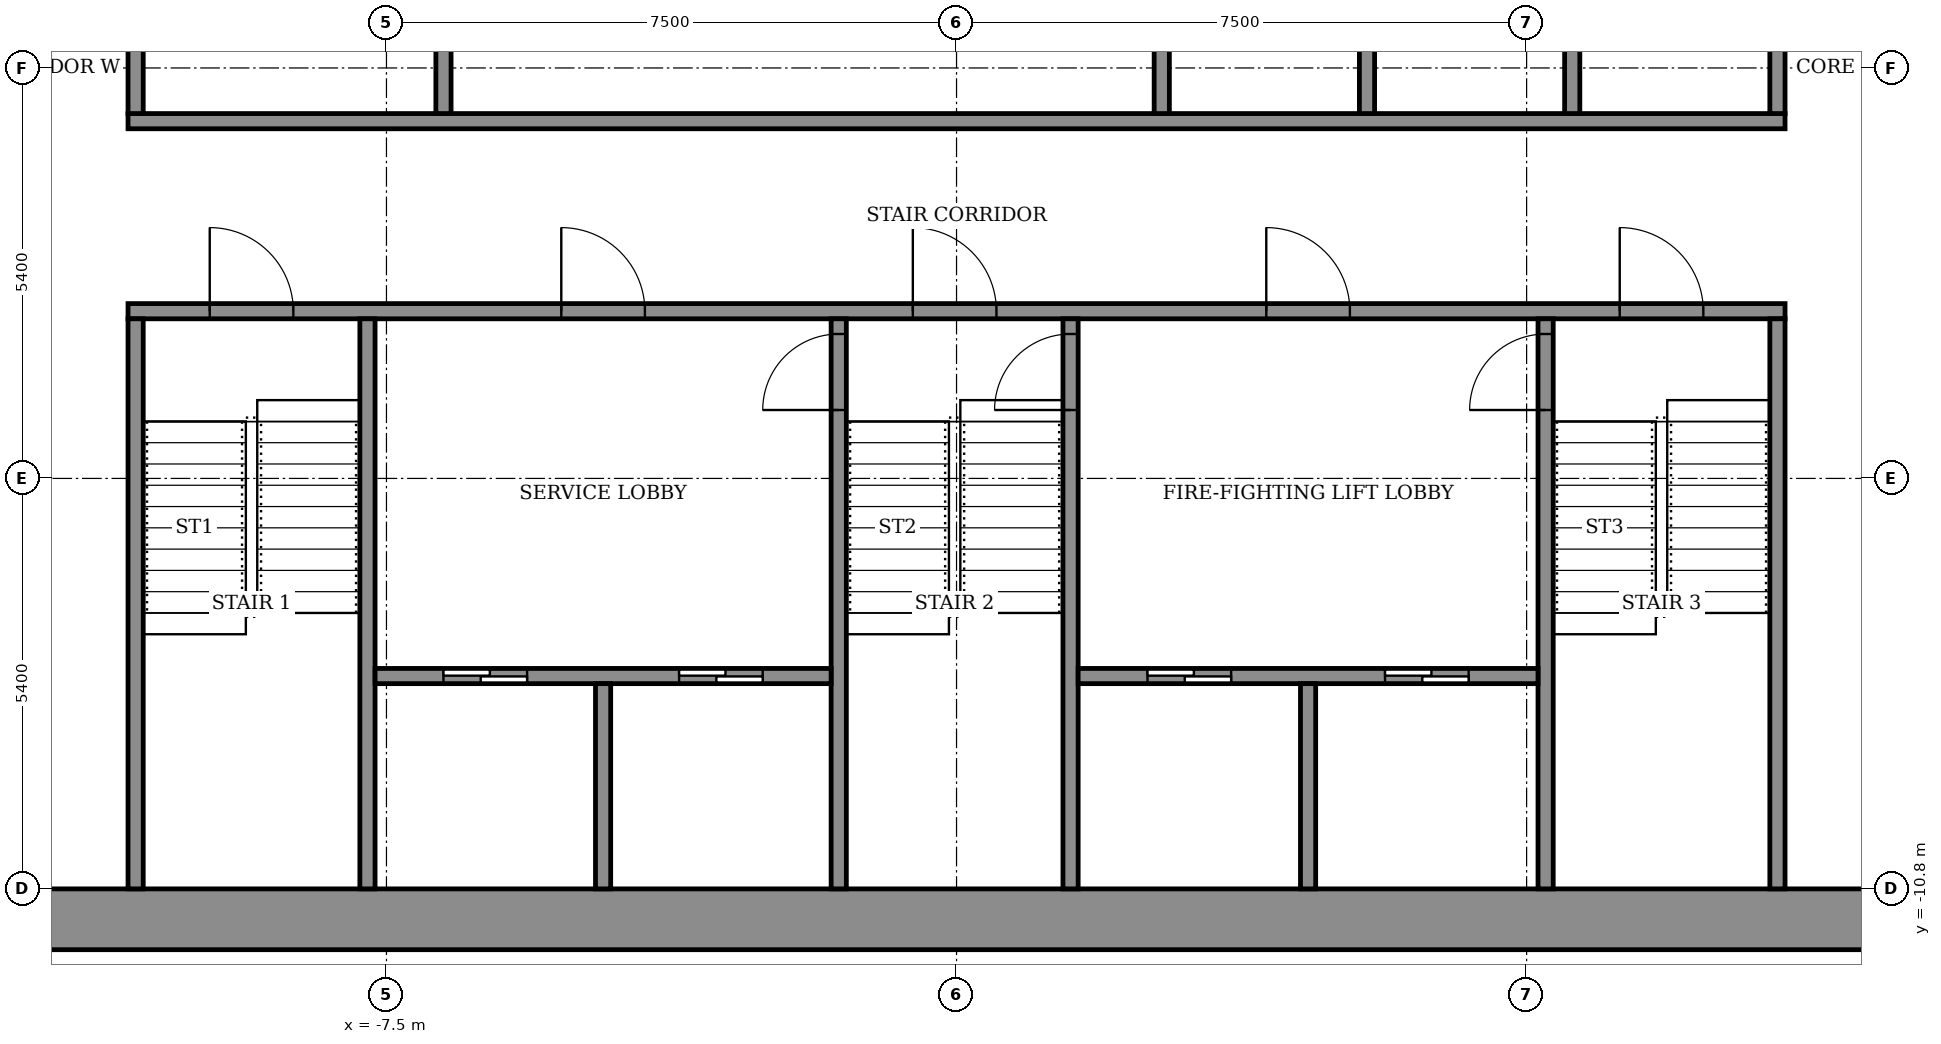
"""IFC4 building model, lengths in metres.
Left out: names, types, materials, properties, quantities, classifications, styles, units other than length and angle.
Written with IfcOpenShell. Run it as: python <this file> out.ifc"""

import sys

from ifc_helpers import new_model, si_unit, direction, frame, frame_2d, origin, place, context, subcontext, project, spatial, rectangle, extrude, element, fill, save


model = new_model("IFC4")
c1 = context("Model", 3, precision=1e-05, world=origin(), true_north=direction((0.0, 1.0)))
c2 = subcontext(c1, "Body", "Model", "MODEL_VIEW")
j1 = project(units=[si_unit("LENGTHUNIT", "METRE"), si_unit("PLANEANGLEUNIT", "RADIAN")], contexts=[c1])
p1 = place(None, origin())
s1 = spatial("IfcSite", under=j1, at=p1, CompositionType="ELEMENT")
p2 = place(p1, origin())
s2 = spatial("IfcBuilding", under=s1, at=p2, CompositionType="ELEMENT")
p3 = place(p2, frame((0.0, 0.0, 201.5)))
s3 = spatial("IfcBuildingStorey", under=s2, at=p3, CompositionType="ELEMENT", Elevation=201.5)
p4 = place(p3, frame((-14.6, -11.2, 0.0), z_axis=(0.0, 0.0, 1.0), x_axis=(1.0, 0.0, 0.0)))
e1 = element("IfcWall", 1, at=p4, inside=s3, PredefinedType="SHEAR", context=c2, shape_type="SweptSolid", body=[
    extrude(rectangle(XDim=29.2, YDim=0.8, at=frame_2d((14.6, 0.0))), origin(), (0.0, 0.0, 1.0), 3.6),
])
p5 = place(p3, frame((-10.9, -3.2, 0.0), z_axis=(0.0, 0.0, 1.0), x_axis=(1.0, 0.0, 0.0)))
e2 = element("IfcWall", 2, at=p5, inside=s3, PredefinedType="SHEAR", context=c2, shape_type="SweptSolid", body=[
    extrude(rectangle(XDim=21.8, YDim=0.2, at=frame_2d((10.9, 0.0))), origin(), (0.0, 0.0, 1.0), 3.05),
])
p6 = place(p5, frame((1.075, 0.0, 0.0)))
e3 = element("IfcOpeningElement", 3, at=p6, cuts=e2, PredefinedType="OPENING", context=c2, shape_type="SweptSolid", body=[
    extrude(rectangle(XDim=1.1, YDim=2.1, at=frame_2d((0.55, 1.05))), frame((0.0, 0.11, 0.0), z_axis=(0.0, -1.0, 0.0), x_axis=(1.0, 0.0, 0.0)), (0.0, 0.0, 1.0), 0.22),
])
p7 = place(p5, frame((10.325, 0.0, 0.0)))
e4 = element("IfcOpeningElement", 4, at=p7, cuts=e2, PredefinedType="OPENING", context=c2, shape_type="SweptSolid", body=[
    extrude(rectangle(XDim=1.1, YDim=2.1, at=frame_2d((0.55, 1.05))), frame((0.0, 0.11, 0.0), z_axis=(0.0, -1.0, 0.0), x_axis=(1.0, 0.0, 0.0)), (0.0, 0.0, 1.0), 0.22),
])
p8 = place(p5, frame((19.625, 0.0, 0.0)))
e5 = element("IfcOpeningElement", 5, at=p8, cuts=e2, PredefinedType="OPENING", context=c2, shape_type="SweptSolid", body=[
    extrude(rectangle(XDim=1.1, YDim=2.1, at=frame_2d((0.55, 1.05))), frame((0.0, 0.11, 0.0), z_axis=(0.0, -1.0, 0.0), x_axis=(1.0, 0.0, 0.0)), (0.0, 0.0, 1.0), 0.22),
])
p9 = place(p5, frame((5.7, 0.0, 0.0)))
e6 = element("IfcOpeningElement", 6, at=p9, cuts=e2, PredefinedType="OPENING", context=c2, shape_type="SweptSolid", body=[
    extrude(rectangle(XDim=1.1, YDim=2.1, at=frame_2d((0.55, 1.05))), frame((0.0, 0.11, 0.0), z_axis=(0.0, -1.0, 0.0), x_axis=(1.0, 0.0, 0.0)), (0.0, 0.0, 1.0), 0.22),
])
p10 = place(p5, frame((14.975, 0.0, 0.0)))
e7 = element("IfcOpeningElement", 7, at=p10, cuts=e2, PredefinedType="OPENING", context=c2, shape_type="SweptSolid", body=[
    extrude(rectangle(XDim=1.1, YDim=2.1, at=frame_2d((0.55, 1.05))), frame((0.0, 0.11, 0.0), z_axis=(0.0, -1.0, 0.0), x_axis=(1.0, 0.0, 0.0)), (0.0, 0.0, 1.0), 0.22),
])
p11 = place(p3, frame((-10.9, -0.7, 0.0), z_axis=(0.0, 0.0, 1.0), x_axis=(1.0, 0.0, 0.0)))
e8 = element("IfcWall", 8, at=p11, inside=s3, PredefinedType="SHEAR", context=c2, shape_type="SweptSolid", body=[
    extrude(rectangle(XDim=21.8, YDim=0.2, at=frame_2d((10.9, 0.0))), origin(), (0.0, 0.0, 1.0), 3.05),
])
for number, where, z_axis, x_axis in (
    (9, (-10.8, -10.8, 0.0), (0.0, 0.0, 1.0), (0.0, 1.0, 0.0)),
    (10, (-7.75, -10.8, 0.0), (0.0, 0.0, 1.0), (0.0, 1.0, 0.0)),
):
    element("IfcWall", number, at=place(p3, frame(where, z_axis=z_axis, x_axis=x_axis)), inside=s3, PredefinedType="SHEAR", context=c2, shape_type="SweptSolid", body=[
        extrude(rectangle(XDim=7.5, YDim=0.2, at=frame_2d((3.75, 0.0))), origin(), (0.0, 0.0, 1.0), 3.05),
    ])
p12 = place(p3, frame((-1.55, -10.8, 0.0), z_axis=(0.0, 0.0, 1.0), x_axis=(0.0, 1.0, 0.0)))
e11 = element("IfcWall", 11, at=p12, inside=s3, PredefinedType="SHEAR", context=c2, shape_type="SweptSolid", body=[
    extrude(rectangle(XDim=7.5, YDim=0.2, at=frame_2d((3.75, 0.0))), origin(), (0.0, 0.0, 1.0), 3.05),
])
p13 = place(p12, frame((6.3, 0.0, 0.0)))
e12 = element("IfcOpeningElement", 12, at=p13, cuts=e11, PredefinedType="OPENING", context=c2, shape_type="SweptSolid", body=[
    extrude(rectangle(XDim=1.0, YDim=2.1, at=frame_2d((0.5, 1.05))), frame((0.0, 0.11, 0.0), z_axis=(0.0, -1.0, 0.0), x_axis=(1.0, 0.0, 0.0)), (0.0, 0.0, 1.0), 0.22),
])
p14 = place(p3, frame((1.5, -10.8, 0.0), z_axis=(0.0, 0.0, 1.0), x_axis=(0.0, 1.0, 0.0)))
e13 = element("IfcWall", 13, at=p14, inside=s3, PredefinedType="SHEAR", context=c2, shape_type="SweptSolid", body=[
    extrude(rectangle(XDim=7.5, YDim=0.2, at=frame_2d((3.75, 0.0))), origin(), (0.0, 0.0, 1.0), 3.05),
])
p15 = place(p14, frame((6.3, 0.0, 0.0)))
e14 = element("IfcOpeningElement", 14, at=p15, cuts=e13, PredefinedType="OPENING", context=c2, shape_type="SweptSolid", body=[
    extrude(rectangle(XDim=1.0, YDim=2.1, at=frame_2d((0.5, 1.05))), frame((0.0, 0.11, 0.0), z_axis=(0.0, -1.0, 0.0), x_axis=(1.0, 0.0, 0.0)), (0.0, 0.0, 1.0), 0.22),
])
p16 = place(p3, frame((7.75, -10.8, 0.0), z_axis=(0.0, 0.0, 1.0), x_axis=(0.0, 1.0, 0.0)))
e15 = element("IfcWall", 15, at=p16, inside=s3, PredefinedType="SHEAR", context=c2, shape_type="SweptSolid", body=[
    extrude(rectangle(XDim=7.5, YDim=0.2, at=frame_2d((3.75, 0.0))), origin(), (0.0, 0.0, 1.0), 3.05),
])
p17 = place(p16, frame((6.3, 0.0, 0.0)))
e16 = element("IfcOpeningElement", 16, at=p17, cuts=e15, PredefinedType="OPENING", context=c2, shape_type="SweptSolid", body=[
    extrude(rectangle(XDim=1.0, YDim=2.1, at=frame_2d((0.5, 1.05))), frame((0.0, 0.11, 0.0), z_axis=(0.0, -1.0, 0.0), x_axis=(1.0, 0.0, 0.0)), (0.0, 0.0, 1.0), 0.22),
])
p18 = place(p3, frame((10.8, -10.8, 0.0), z_axis=(0.0, 0.0, 1.0), x_axis=(0.0, 1.0, 0.0)))
e17 = element("IfcWall", 17, at=p18, inside=s3, PredefinedType="SHEAR", context=c2, shape_type="SweptSolid", body=[
    extrude(rectangle(XDim=7.5, YDim=0.2, at=frame_2d((3.75, 0.0))), origin(), (0.0, 0.0, 1.0), 3.05),
])
p19 = place(p3, frame((-7.65, -8.0, 0.0), z_axis=(0.0, 0.0, 1.0), x_axis=(1.0, 0.0, 0.0)))
e18 = element("IfcWall", 18, at=p19, inside=s3, PredefinedType="SHEAR", context=c2, shape_type="SweptSolid", body=[
    extrude(rectangle(XDim=6.0, YDim=0.2, at=frame_2d((3.0, 0.0))), origin(), (0.0, 0.0, 1.0), 3.05),
])
p20 = place(p19, frame((0.9, 0.0, 0.0)))
e19 = element("IfcOpeningElement", 19, at=p20, cuts=e18, PredefinedType="OPENING", context=c2, shape_type="SweptSolid", body=[
    extrude(rectangle(XDim=1.1, YDim=2.1, at=frame_2d((0.55, 1.05))), frame((0.0, 0.11, 0.0), z_axis=(0.0, -1.0, 0.0), x_axis=(1.0, 0.0, 0.0)), (0.0, 0.0, 1.0), 0.22),
])
p21 = place(p19, frame((4.0, 0.0, 0.0)))
e20 = element("IfcOpeningElement", 20, at=p21, cuts=e18, PredefinedType="OPENING", context=c2, shape_type="SweptSolid", body=[
    extrude(rectangle(XDim=1.1, YDim=2.1, at=frame_2d((0.55, 1.05))), frame((0.0, 0.11, 0.0), z_axis=(0.0, -1.0, 0.0), x_axis=(1.0, 0.0, 0.0)), (0.0, 0.0, 1.0), 0.22),
])
p22 = place(p3, frame((-4.65, -10.8, 0.0), z_axis=(0.0, 0.0, 1.0), x_axis=(0.0, 1.0, 0.0)))
e21 = element("IfcWall", 21, at=p22, inside=s3, PredefinedType="SHEAR", context=c2, shape_type="SweptSolid", body=[
    extrude(rectangle(XDim=2.7, YDim=0.2, at=frame_2d((1.35, 0.0))), origin(), (0.0, 0.0, 1.0), 3.05),
])
p23 = place(p3, frame((1.6, -8.0, 0.0), z_axis=(0.0, 0.0, 1.0), x_axis=(1.0, 0.0, 0.0)))
e22 = element("IfcWall", 22, at=p23, inside=s3, PredefinedType="SHEAR", context=c2, shape_type="SweptSolid", body=[
    extrude(rectangle(XDim=6.05, YDim=0.2, at=frame_2d((3.025, 0.0))), origin(), (0.0, 0.0, 1.0), 3.05),
])
p24 = place(p23, frame((0.913, 0.0, 0.0)))
e23 = element("IfcOpeningElement", 23, at=p24, cuts=e22, PredefinedType="OPENING", context=c2, shape_type="SweptSolid", body=[
    extrude(rectangle(XDim=1.1, YDim=2.1, at=frame_2d((0.55, 1.05))), frame((0.0, 0.11, 0.0), z_axis=(0.0, -1.0, 0.0), x_axis=(1.0, 0.0, 0.0)), (0.0, 0.0, 1.0), 0.22),
])
p25 = place(p23, frame((4.038, 0.0, 0.0)))
e24 = element("IfcOpeningElement", 24, at=p25, cuts=e22, PredefinedType="OPENING", context=c2, shape_type="SweptSolid", body=[
    extrude(rectangle(XDim=1.1, YDim=2.1, at=frame_2d((0.55, 1.05))), frame((0.0, 0.11, 0.0), z_axis=(0.0, -1.0, 0.0), x_axis=(1.0, 0.0, 0.0)), (0.0, 0.0, 1.0), 0.22),
])
p26 = place(p3, frame((4.625, -10.8, 0.0), z_axis=(0.0, 0.0, 1.0), x_axis=(0.0, 1.0, 0.0)))
e25 = element("IfcWall", 25, at=p26, inside=s3, PredefinedType="SHEAR", context=c2, shape_type="SweptSolid", body=[
    extrude(rectangle(XDim=2.7, YDim=0.2, at=frame_2d((1.35, 0.0))), origin(), (0.0, 0.0, 1.0), 3.05),
])
for number, where, z_axis, x_axis in (
    (26, (-10.8, -0.6, 0.0), (0.0, 0.0, 1.0), (0.0, 1.0, 0.0)),
    (27, (-6.75, -0.6, 0.0), (0.0, 0.0, 1.0), (0.0, 1.0, 0.0)),
):
    element("IfcWall", number, at=place(p3, frame(where, z_axis=z_axis, x_axis=x_axis)), inside=s3, PredefinedType="STANDARD", context=c2, shape_type="SweptSolid", body=[
        extrude(rectangle(XDim=2.5, YDim=0.2, at=frame_2d((1.25, 0.0))), origin(), (0.0, 0.0, 1.0), 3.05),
    ])
for number, where, z_axis, x_axis in (
    (28, (2.7, -0.6, 0.0), (0.0, 0.0, 1.0), (0.0, 1.0, 0.0)),
    (29, (5.4, -0.6, 0.0), (0.0, 0.0, 1.0), (0.0, 1.0, 0.0)),
    (30, (8.1, -0.6, 0.0), (0.0, 0.0, 1.0), (0.0, 1.0, 0.0)),
    (31, (10.8, -0.6, 0.0), (0.0, 0.0, 1.0), (0.0, 1.0, 0.0)),
):
    element("IfcWall", number, at=place(p3, frame(where, z_axis=z_axis, x_axis=x_axis)), inside=s3, PredefinedType="SHEAR", context=c2, shape_type="SweptSolid", body=[
        extrude(rectangle(XDim=2.5, YDim=0.2, at=frame_2d((1.25, 0.0))), origin(), (0.0, 0.0, 1.0), 3.05),
    ])
p27 = place(p24, origin())
e32 = element("IfcDoor", 32, at=p27, inside=s3, OperationType="SLIDING_TO_LEFT", PredefinedType="DOOR", context=c2, shape_type="SweptSolid", body=[
    extrude(rectangle(XDim=1.1, YDim=2.1, at=frame_2d((0.55, 1.05))), frame((0.0, 0.025, 0.0), z_axis=(0.0, -1.0, 0.0), x_axis=(1.0, 0.0, 0.0)), (0.0, 0.0, 1.0), 0.05),
])
fill(e23, e32)
p28 = place(p20, origin())
e33 = element("IfcDoor", 33, at=p28, inside=s3, OperationType="SLIDING_TO_LEFT", PredefinedType="DOOR", context=c2, shape_type="SweptSolid", body=[
    extrude(rectangle(XDim=1.1, YDim=2.1, at=frame_2d((0.55, 1.05))), frame((0.0, 0.025, 0.0), z_axis=(0.0, -1.0, 0.0), x_axis=(1.0, 0.0, 0.0)), (0.0, 0.0, 1.0), 0.05),
])
fill(e19, e33)
p29 = place(p25, origin())
e34 = element("IfcDoor", 34, at=p29, inside=s3, OperationType="SLIDING_TO_LEFT", PredefinedType="DOOR", context=c2, shape_type="SweptSolid", body=[
    extrude(rectangle(XDim=1.1, YDim=2.1, at=frame_2d((0.55, 1.05))), frame((0.0, 0.025, 0.0), z_axis=(0.0, -1.0, 0.0), x_axis=(1.0, 0.0, 0.0)), (0.0, 0.0, 1.0), 0.05),
])
fill(e24, e34)
p30 = place(p21, origin())
e35 = element("IfcDoor", 35, at=p30, inside=s3, OperationType="SLIDING_TO_LEFT", PredefinedType="DOOR", context=c2, shape_type="SweptSolid", body=[
    extrude(rectangle(XDim=1.1, YDim=2.1, at=frame_2d((0.55, 1.05))), frame((0.0, 0.025, 0.0), z_axis=(0.0, -1.0, 0.0), x_axis=(1.0, 0.0, 0.0)), (0.0, 0.0, 1.0), 0.05),
])
fill(e20, e35)
p31 = place(p6, origin())
e36 = element("IfcDoor", 36, at=p31, inside=s3, OperationType="SINGLE_SWING_RIGHT", PredefinedType="DOOR", context=c2, shape_type="SweptSolid", body=[
    extrude(rectangle(XDim=1.1, YDim=2.1, at=frame_2d((0.55, 1.05))), frame((0.0, 0.025, 0.0), z_axis=(0.0, -1.0, 0.0), x_axis=(1.0, 0.0, 0.0)), (0.0, 0.0, 1.0), 0.05),
])
fill(e3, e36)
p32 = place(p7, origin())
e37 = element("IfcDoor", 37, at=p32, inside=s3, OperationType="SINGLE_SWING_RIGHT", PredefinedType="DOOR", context=c2, shape_type="SweptSolid", body=[
    extrude(rectangle(XDim=1.1, YDim=2.1, at=frame_2d((0.55, 1.05))), frame((0.0, 0.025, 0.0), z_axis=(0.0, -1.0, 0.0), x_axis=(1.0, 0.0, 0.0)), (0.0, 0.0, 1.0), 0.05),
])
fill(e4, e37)
p33 = place(p8, origin())
e38 = element("IfcDoor", 38, at=p33, inside=s3, OperationType="SINGLE_SWING_RIGHT", PredefinedType="DOOR", context=c2, shape_type="SweptSolid", body=[
    extrude(rectangle(XDim=1.1, YDim=2.1, at=frame_2d((0.55, 1.05))), frame((0.0, 0.025, 0.0), z_axis=(0.0, -1.0, 0.0), x_axis=(1.0, 0.0, 0.0)), (0.0, 0.0, 1.0), 0.05),
])
fill(e5, e38)
p34 = place(p9, origin())
e39 = element("IfcDoor", 39, at=p34, inside=s3, OperationType="SINGLE_SWING_LEFT", PredefinedType="DOOR", context=c2, shape_type="SweptSolid", body=[
    extrude(rectangle(XDim=1.1, YDim=2.1, at=frame_2d((0.55, 1.05))), frame((0.0, 0.025, 0.0), z_axis=(0.0, -1.0, 0.0), x_axis=(1.0, 0.0, 0.0)), (0.0, 0.0, 1.0), 0.05),
])
fill(e6, e39)
p35 = place(p10, origin())
e40 = element("IfcDoor", 40, at=p35, inside=s3, OperationType="SINGLE_SWING_LEFT", PredefinedType="DOOR", context=c2, shape_type="SweptSolid", body=[
    extrude(rectangle(XDim=1.1, YDim=2.1, at=frame_2d((0.55, 1.05))), frame((0.0, 0.025, 0.0), z_axis=(0.0, -1.0, 0.0), x_axis=(1.0, 0.0, 0.0)), (0.0, 0.0, 1.0), 0.05),
])
fill(e7, e40)
p36 = place(p13, origin())
e41 = element("IfcDoor", 41, at=p36, inside=s3, OperationType="SINGLE_SWING_RIGHT", PredefinedType="DOOR", context=c2, shape_type="SweptSolid", body=[
    extrude(rectangle(XDim=1.0, YDim=2.1, at=frame_2d((0.5, 1.05))), frame((0.0, 0.025, 0.0), z_axis=(0.0, -1.0, 0.0), x_axis=(1.0, 0.0, 0.0)), (0.0, 0.0, 1.0), 0.05),
])
fill(e12, e41)
p37 = place(p15, origin())
e42 = element("IfcDoor", 42, at=p37, inside=s3, OperationType="SINGLE_SWING_RIGHT", PredefinedType="DOOR", context=c2, shape_type="SweptSolid", body=[
    extrude(rectangle(XDim=1.0, YDim=2.1, at=frame_2d((0.5, 1.05))), frame((0.0, 0.025, 0.0), z_axis=(0.0, -1.0, 0.0), x_axis=(1.0, 0.0, 0.0)), (0.0, 0.0, 1.0), 0.05),
])
fill(e14, e42)
p38 = place(p17, origin())
e43 = element("IfcDoor", 43, at=p38, inside=s3, OperationType="SINGLE_SWING_RIGHT", PredefinedType="DOOR", context=c2, shape_type="SweptSolid", body=[
    extrude(rectangle(XDim=1.0, YDim=2.1, at=frame_2d((0.5, 1.05))), frame((0.0, 0.025, 0.0), z_axis=(0.0, -1.0, 0.0), x_axis=(1.0, 0.0, 0.0)), (0.0, 0.0, 1.0), 0.05),
])
fill(e16, e43)
save(model, sys.argv[1])
